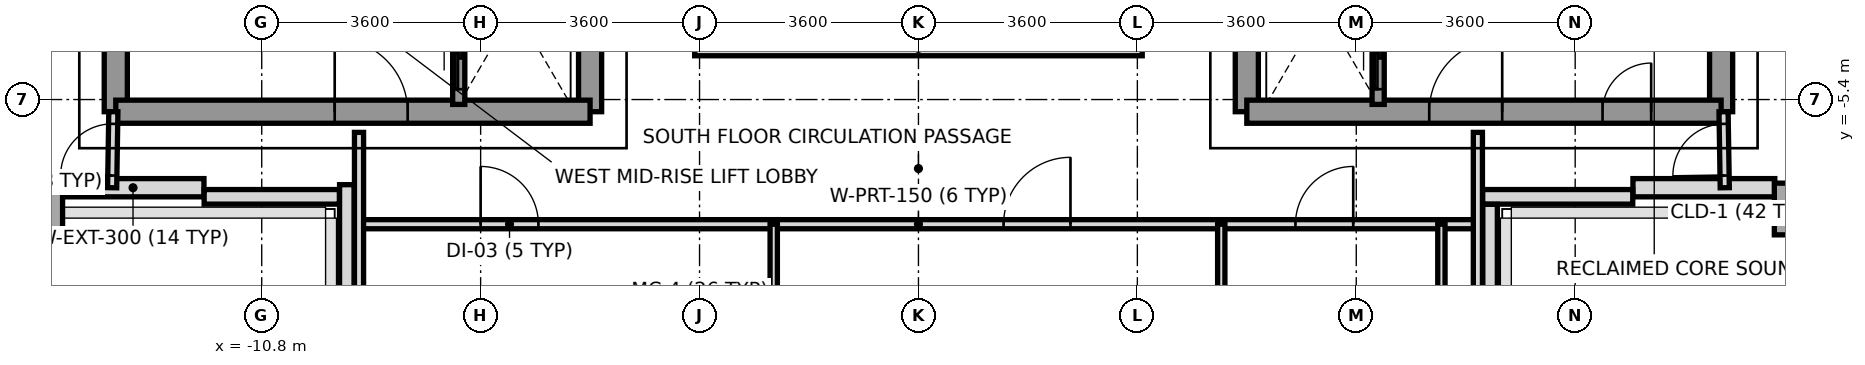
"""IFC4 building model, lengths in metres.
Left out: names, types, materials, properties, quantities, classifications, styles, units other than length and angle.
Written with IfcOpenShell. Run it as: python <this file> out.ifc"""

import sys

from ifc_helpers import new_model, si_unit, direction, frame, frame_2d, origin, origin_2d, place, context, subcontext, project, spatial, rectangle, extrude, source, transform, mapped, element, fill, save


model = new_model("IFC4")
c1 = context("Model", 3, precision=1e-05, world=origin(), true_north=direction((0.0, 1.0)))
c2 = subcontext(c1, "Body", "Model", "MODEL_VIEW")
j1 = project(units=[si_unit("LENGTHUNIT", "METRE"), si_unit("PLANEANGLEUNIT", "RADIAN")], contexts=[c1])
p1 = place(None, origin())
s1 = spatial("IfcSite", under=j1, at=p1, CompositionType="ELEMENT")
p2 = place(p1, origin())
s2 = spatial("IfcBuilding", under=s1, at=p2, CompositionType="ELEMENT")
p3 = place(p2, frame((0.0, 0.0, 170.6)))
s3 = spatial("IfcBuildingStorey", under=s2, at=p3, CompositionType="ELEMENT", Elevation=170.6)
m1 = source(origin(), c2, "Body", "SweptSolid", [
    extrude(rectangle(XDim=0.65, YDim=0.85, at=origin_2d()), origin(), (0.0, 0.0, 1.0), 3.2),
])
for number, where, z_axis, x_axis in (
    (1, (-14.4, -7.2, 0.0), (0.0, 0.0, 1.0), (1.0, 0.0, 0.0)),
    (2, (14.4, -7.2, 0.0), (0.0, 0.0, 1.0), (1.0, 0.0, 0.0)),
):
    element("IfcColumn", number, at=place(p3, frame(where, z_axis=z_axis, x_axis=x_axis)), inside=s3, PredefinedType="COLUMN", context=c2, shape_type="MappedRepresentation", body=[
        mapped(m1, transform((0.0, 0.0, 0.0), x_axis=(1.0, 0.0, 0.0), y_axis=(0.0, 1.0, 0.0), z_axis=(0.0, 0.0, 1.0), scale=1.0)),
    ])
for number, where, z_axis, x_axis in (
    (3, (-14.083, -6.85, 0.0), (0.0, 0.0, 1.0), (1.0, 0.0, 0.0)),
    (4, (11.75, -6.85, 0.0), (0.0, 0.0, 1.0), (1.0, 0.0, 0.0)),
):
    element("IfcWall", number, at=place(p3, frame(where, z_axis=z_axis, x_axis=x_axis)), inside=s3, PredefinedType="SOLIDWALL", context=c2, shape_type="SweptSolid", body=[
        extrude(rectangle(XDim=2.333, YDim=0.3, at=frame_2d((1.167, 0.0))), origin(), (0.0, 0.0, 1.0), 3.2),
    ])
p4 = place(p3, frame((11.747, -7.0, 0.0), z_axis=(0.0, 0.0, 1.0), x_axis=(-1.0, 0.0, 0.0)))
e5 = element("IfcWall", 5, at=p4, inside=s3, PredefinedType="PARAPET", context=c2, shape_type="SweptSolid", body=[
    extrude(rectangle(XDim=2.469, YDim=0.24, at=frame_2d((1.234, 0.0))), origin(), (0.0, 0.0, 1.0), 1.15),
])
p5 = place(p3, frame((9.4, -7.123, 0.0), z_axis=(0.0, 0.0, 1.0), x_axis=(0.0, -1.0, 0.0)))
e6 = element("IfcWall", 6, at=p5, inside=s3, PredefinedType="PARAPET", context=c2, shape_type="SweptSolid", body=[
    extrude(rectangle(XDim=1.424, YDim=0.24, at=frame_2d((0.712, 0.0))), origin(), (0.0, 0.0, 1.0), 1.15),
])
p6 = place(p3, frame((-9.4, -8.547, 0.0), z_axis=(0.0, 0.0, 1.0), x_axis=(0.0, 1.0, 0.0)))
e7 = element("IfcWall", 7, at=p6, inside=s3, PredefinedType="PARAPET", context=c2, shape_type="SweptSolid", body=[
    extrude(rectangle(XDim=1.747, YDim=0.24, at=frame_2d((0.874, 0.0))), origin(), (0.0, 0.0, 1.0), 1.15),
])
p7 = place(p3, frame((-9.523, -7.0, 0.0), z_axis=(0.0, 0.0, 1.0), x_axis=(-1.0, 0.0, 0.0)))
e8 = element("IfcWall", 8, at=p7, inside=s3, PredefinedType="PARAPET", context=c2, shape_type="SweptSolid", body=[
    extrude(rectangle(XDim=2.224, YDim=0.24, at=frame_2d((1.112, 0.0))), origin(), (0.0, 0.0, 1.0), 1.15),
])
p8 = place(p3, frame((-13.2, -5.6, 0.0), z_axis=(0.0, 0.0, 1.0), x_axis=(0.0, 1.0, 0.0)))
e9 = element("IfcWall", 9, at=p8, inside=s3, PredefinedType="SHEAR", context=c2, shape_type="SweptSolid", body=[
    extrude(rectangle(XDim=11.2, YDim=0.38, at=frame_2d((5.6, 0.0))), origin(), (0.0, 0.0, 1.0), 3.2),
])
p9 = place(p3, frame((-5.4, -5.6, 0.0), z_axis=(0.0, 0.0, 1.0), x_axis=(0.0, 1.0, 0.0)))
e10 = element("IfcWall", 10, at=p9, inside=s3, PredefinedType="SHEAR", context=c2, shape_type="SweptSolid", body=[
    extrude(rectangle(XDim=12.5, YDim=0.38, at=frame_2d((6.25, 0.0))), origin(), (0.0, 0.0, 1.0), 3.2),
])
p10 = place(p9, frame((4.55, 0.0, 0.0)))
e11 = element("IfcOpeningElement", 11, at=p10, cuts=e10, PredefinedType="OPENING", context=c2, shape_type="SweptSolid", body=[
    extrude(rectangle(XDim=1.2, YDim=2.2, at=frame_2d((0.6, 1.1))), frame((0.0, 0.2, 0.0), z_axis=(0.0, -1.0, 0.0), x_axis=(1.0, 0.0, 0.0)), (0.0, 0.0, 1.0), 0.4),
])
p11 = place(p3, frame((-13.2, -5.6, 0.0), z_axis=(0.0, 0.0, 1.0), x_axis=(1.0, 0.0, 0.0)))
e12 = element("IfcWall", 12, at=p11, inside=s3, PredefinedType="SHEAR", context=c2, shape_type="SweptSolid", body=[
    extrude(rectangle(XDim=7.8, YDim=0.38, at=frame_2d((3.9, 0.0))), origin(), (0.0, 0.0, 1.0), 3.2),
])
p12 = place(p11, frame((3.6, 0.0, 0.0)))
e13 = element("IfcOpeningElement", 13, at=p12, cuts=e12, PredefinedType="OPENING", context=c2, shape_type="SweptSolid", body=[
    extrude(rectangle(XDim=1.2, YDim=2.2, at=frame_2d((0.6, 1.1))), frame((0.0, 0.2, 0.0), z_axis=(0.0, -1.0, 0.0), x_axis=(1.0, 0.0, 0.0)), (0.0, 0.0, 1.0), 0.4),
])
p13 = place(p3, frame((13.2, -5.6, 0.0), z_axis=(0.0, 0.0, 1.0), x_axis=(0.0, 1.0, 0.0)))
e14 = element("IfcWall", 14, at=p13, inside=s3, PredefinedType="SHEAR", context=c2, shape_type="SweptSolid", body=[
    extrude(rectangle(XDim=11.2, YDim=0.38, at=frame_2d((5.6, 0.0))), origin(), (0.0, 0.0, 1.0), 3.2),
])
p14 = place(p3, frame((5.4, -5.6, 0.0), z_axis=(0.0, 0.0, 1.0), x_axis=(0.0, 1.0, 0.0)))
e15 = element("IfcWall", 15, at=p14, inside=s3, PredefinedType="SHEAR", context=c2, shape_type="SweptSolid", body=[
    extrude(rectangle(XDim=12.5, YDim=0.38, at=frame_2d((6.25, 0.0))), origin(), (0.0, 0.0, 1.0), 3.2),
])
p15 = place(p14, frame((4.55, 0.0, 0.0)))
e16 = element("IfcOpeningElement", 16, at=p15, cuts=e15, PredefinedType="OPENING", context=c2, shape_type="SweptSolid", body=[
    extrude(rectangle(XDim=1.2, YDim=2.2, at=frame_2d((0.6, 1.1))), frame((0.0, 0.2, 0.0), z_axis=(0.0, -1.0, 0.0), x_axis=(1.0, 0.0, 0.0)), (0.0, 0.0, 1.0), 0.4),
])
p16 = place(p14, frame((7.88, 0.0, 0.0)))
e17 = element("IfcOpeningElement", 17, at=p16, cuts=e15, PredefinedType="OPENING", context=c2, shape_type="SweptSolid", body=[
    extrude(rectangle(XDim=0.8, YDim=2.1, at=frame_2d((0.4, 1.05))), frame((0.0, 0.2, 0.0), z_axis=(0.0, -1.0, 0.0), x_axis=(1.0, 0.0, 0.0)), (0.0, 0.0, 1.0), 0.4),
])
p17 = place(p3, frame((5.4, -5.6, 0.0), z_axis=(0.0, 0.0, 1.0), x_axis=(1.0, 0.0, 0.0)))
e18 = element("IfcWall", 18, at=p17, inside=s3, PredefinedType="SHEAR", context=c2, shape_type="SweptSolid", body=[
    extrude(rectangle(XDim=7.8, YDim=0.38, at=frame_2d((3.9, 0.0))), origin(), (0.0, 0.0, 1.0), 3.2),
])
p18 = place(p17, frame((3.0, 0.0, 0.0)))
e19 = element("IfcOpeningElement", 19, at=p18, cuts=e18, PredefinedType="OPENING", context=c2, shape_type="SweptSolid", body=[
    extrude(rectangle(XDim=1.2, YDim=2.2, at=frame_2d((0.6, 1.1))), frame((0.0, 0.2, 0.0), z_axis=(0.0, -1.0, 0.0), x_axis=(1.0, 0.0, 0.0)), (0.0, 0.0, 1.0), 0.4),
])
p19 = place(p17, frame((5.85, 0.0, 0.0)))
e20 = element("IfcOpeningElement", 20, at=p19, cuts=e18, PredefinedType="OPENING", context=c2, shape_type="SweptSolid", body=[
    extrude(rectangle(XDim=0.8, YDim=2.1, at=frame_2d((0.4, 1.05))), frame((0.0, 0.2, 0.0), z_axis=(0.0, -1.0, 0.0), x_axis=(1.0, 0.0, 0.0)), (0.0, 0.0, 1.0), 0.4),
])
p20 = place(p3, frame((-7.56, -5.48, 0.0), z_axis=(0.0, 0.0, 1.0), x_axis=(0.0, 1.0, 0.0)))
e21 = element("IfcWall", 21, at=p20, inside=s3, PredefinedType="SOLIDWALL", context=c2, shape_type="SweptSolid", body=[
    extrude(rectangle(XDim=1.6, YDim=0.2, at=frame_2d((0.8, 0.0))), origin(), (0.0, 0.0, 1.0), 3.2),
])
p21 = place(p20, frame((0.25, 0.0, 0.0)))
e22 = element("IfcOpeningElement", 22, at=p21, cuts=e21, PredefinedType="OPENING", context=c2, shape_type="SweptSolid", body=[
    extrude(rectangle(XDim=1.1, YDim=2.2, at=frame_2d((0.55, 1.1))), frame((0.0, 0.11, 0.0), z_axis=(0.0, -1.0, 0.0), x_axis=(1.0, 0.0, 0.0)), (0.0, 0.0, 1.0), 0.22),
])
p22 = place(p3, frame((7.56, -5.48, 0.0), z_axis=(0.0, 0.0, 1.0), x_axis=(0.0, 1.0, 0.0)))
e23 = element("IfcWall", 23, at=p22, inside=s3, PredefinedType="SOLIDWALL", context=c2, shape_type="SweptSolid", body=[
    extrude(rectangle(XDim=1.6, YDim=0.2, at=frame_2d((0.8, 0.0))), origin(), (0.0, 0.0, 1.0), 3.2),
])
p23 = place(p22, frame((0.25, 0.0, 0.0)))
e24 = element("IfcOpeningElement", 24, at=p23, cuts=e23, PredefinedType="OPENING", context=c2, shape_type="SweptSolid", body=[
    extrude(rectangle(XDim=1.1, YDim=2.2, at=frame_2d((0.55, 1.1))), frame((0.0, 0.11, 0.0), z_axis=(0.0, -1.0, 0.0), x_axis=(1.0, 0.0, 0.0)), (0.0, 0.0, 1.0), 0.22),
])
p24 = place(p3, frame((-9.2, -7.45, 0.0), z_axis=(0.0, 0.0, 1.0), x_axis=(1.0, 0.0, 0.0)))
e25 = element("IfcWall", 25, at=p24, inside=s3, PredefinedType="PARTITIONING", context=c2, shape_type="SweptSolid", body=[
    extrude(rectangle(XDim=18.4, YDim=0.15, at=frame_2d((9.2, 0.0))), origin(), (0.0, 0.0, 1.0), 2.8),
])
p25 = place(p24, frame((15.4, 0.0, 0.0)))
e26 = element("IfcOpeningElement", 26, at=p25, cuts=e25, PredefinedType="OPENING", context=c2, shape_type="SweptSolid", body=[
    extrude(rectangle(XDim=0.95, YDim=2.15, at=frame_2d((0.475, 1.075))), frame((0.0, 0.085, 0.0), z_axis=(0.0, -1.0, 0.0), x_axis=(1.0, 0.0, 0.0)), (0.0, 0.0, 1.0), 0.17),
])
p26 = place(p24, frame((2.0, 0.0, 0.0)))
e27 = element("IfcOpeningElement", 27, at=p26, cuts=e25, PredefinedType="OPENING", context=c2, shape_type="SweptSolid", body=[
    extrude(rectangle(XDim=0.95, YDim=2.15, at=frame_2d((0.475, 1.075))), frame((0.0, 0.085, 0.0), z_axis=(0.0, -1.0, 0.0), x_axis=(1.0, 0.0, 0.0)), (0.0, 0.0, 1.0), 0.17),
])
p27 = place(p24, frame((10.6, 0.0, 0.0)))
e28 = element("IfcOpeningElement", 28, at=p27, cuts=e25, PredefinedType="OPENING", context=c2, shape_type="SweptSolid", body=[
    extrude(rectangle(XDim=1.1, YDim=2.2, at=frame_2d((0.55, 1.1))), frame((0.0, 0.085, 0.0), z_axis=(0.0, -1.0, 0.0), x_axis=(1.0, 0.0, 0.0)), (0.0, 0.0, 1.0), 0.17),
])
for number, where, z_axis, x_axis in (
    (29, (-9.2, -15.68, 0.0), (0.0, 0.0, 1.0), (0.0, 1.0, 0.0)),
    (30, (9.2, -15.68, 0.0), (0.0, 0.0, 1.0), (0.0, 1.0, 0.0)),
):
    element("IfcWall", number, at=place(p3, frame(where, z_axis=z_axis, x_axis=x_axis)), inside=s3, PredefinedType="PARTITIONING", context=c2, shape_type="SweptSolid", body=[
        extrude(rectangle(XDim=9.74, YDim=0.15, at=frame_2d((4.87, 0.0))), origin(), (0.0, 0.0, 1.0), 2.75),
    ])
p28 = place(p3, frame((4.98, -10.95, 0.0), z_axis=(0.0, 0.0, 1.0), x_axis=(0.0, 1.0, 0.0)))
e31 = element("IfcWall", 31, at=p28, inside=s3, PredefinedType="PARTITIONING", context=c2, shape_type="SweptSolid", body=[
    extrude(rectangle(XDim=3.5, YDim=0.12, at=frame_2d((1.75, 0.0))), origin(), (0.0, 0.0, 1.0), 3.2),
])
p29 = place(p3, frame((8.6, -10.95, 0.0), z_axis=(0.0, 0.0, 1.0), x_axis=(0.0, 1.0, 0.0)))
e32 = element("IfcWall", 32, at=p29, inside=s3, PredefinedType="PARTITIONING", context=c2, shape_type="SweptSolid", body=[
    extrude(rectangle(XDim=3.5, YDim=0.12, at=frame_2d((1.75, 0.0))), origin(), (0.0, 0.0, 1.0), 2.75),
])
p30 = place(p3, frame((-2.38, -24.65, 0.0), z_axis=(0.0, 0.0, 1.0), x_axis=(0.0, 1.0, 0.0)))
e33 = element("IfcWall", 33, at=p30, inside=s3, PredefinedType="PARTITIONING", context=c2, shape_type="SweptSolid", body=[
    extrude(rectangle(XDim=17.2, YDim=0.12, at=frame_2d((8.6, 0.0))), origin(), (0.0, 0.0, 1.0), 2.75),
])
p31 = place(p3, frame((-13.26, -6.85, 0.0), z_axis=(0.0, 0.0, 1.0), x_axis=(0.016013571389, 0.999871774545, 0.0)))
e34 = element("IfcWall", 34, at=p31, inside=s3, PredefinedType="PARTITIONING", context=c2, shape_type="SweptSolid", body=[
    extrude(rectangle(XDim=1.25, YDim=0.15, at=frame_2d((0.625, 0.0))), origin(), (0.0, 0.0, 1.0), 3.2),
])
p32 = place(p31, frame((0.2, 0.0, 0.0)))
e35 = element("IfcOpeningElement", 35, at=p32, cuts=e34, PredefinedType="OPENING", context=c2, shape_type="SweptSolid", body=[
    extrude(rectangle(XDim=0.85, YDim=2.1, at=frame_2d((0.425, 1.05))), frame((0.0, 0.085, 0.0), z_axis=(0.0, -1.0, 0.0), x_axis=(1.0, 0.0, 0.0)), (0.0, 0.0, 1.0), 0.17),
])
p33 = place(p3, frame((13.26, -6.85, 0.0), z_axis=(0.0, 0.0, 1.0), x_axis=(-0.016013571389, 0.999871774545, 0.0)))
e36 = element("IfcWall", 36, at=p33, inside=s3, PredefinedType="PARTITIONING", context=c2, shape_type="SweptSolid", body=[
    extrude(rectangle(XDim=1.25, YDim=0.15, at=frame_2d((0.625, 0.0))), origin(), (0.0, 0.0, 1.0), 3.2),
])
p34 = place(p33, frame((0.2, 0.0, 0.0)))
e37 = element("IfcOpeningElement", 37, at=p34, cuts=e36, PredefinedType="OPENING", context=c2, shape_type="SweptSolid", body=[
    extrude(rectangle(XDim=0.85, YDim=2.1, at=frame_2d((0.425, 1.05))), frame((0.0, 0.085, 0.0), z_axis=(0.0, -1.0, 0.0), x_axis=(1.0, 0.0, 0.0)), (0.0, 0.0, 1.0), 0.17),
])
p35 = place(p3, frame((-3.68, -4.56, 0.0), z_axis=(0.0, 0.0, 1.0), x_axis=(1.0, 0.0, 0.0)))
e38 = element("IfcWall", 38, at=p35, inside=s3, PredefinedType="PARAPET", context=c2, shape_type="SweptSolid", body=[
    extrude(rectangle(XDim=7.36, YDim=0.24, at=frame_2d((3.68, 0.0))), origin(), (0.0, 0.0, 1.0), 1.15),
])
m2 = source(origin(), c2, "Body", "SweptSolid", [
    extrude(rectangle(XDim=1.2, YDim=2.2, at=frame_2d((0.6, 1.1))), frame((0.0, 0.025, 0.0), z_axis=(0.0, -1.0, 0.0), x_axis=(1.0, 0.0, 0.0)), (0.0, 0.0, 1.0), 0.05),
])
p36 = place(p12, origin())
e39 = element("IfcDoor", 39, at=p36, inside=s3, OperationType="SINGLE_SWING_LEFT", PredefinedType="DOOR", context=c2, shape_type="MappedRepresentation", body=[
    mapped(m2, transform((0.0, 0.0, 0.0), x_axis=(1.0, 0.0, 0.0), y_axis=(0.0, 1.0, 0.0), z_axis=(0.0, 0.0, 1.0), scale=1.0)),
])
fill(e13, e39)
p37 = place(p18, origin())
e40 = element("IfcDoor", 40, at=p37, inside=s3, OperationType="SINGLE_SWING_RIGHT", PredefinedType="DOOR", context=c2, shape_type="MappedRepresentation", body=[
    mapped(m2, transform((0.0, 0.0, 0.0), x_axis=(1.0, 0.0, 0.0), y_axis=(0.0, 1.0, 0.0), z_axis=(0.0, 0.0, 1.0), scale=1.0)),
])
fill(e19, e40)
m3 = source(origin(), c2, "Body", "SweptSolid", [
    extrude(rectangle(XDim=0.8, YDim=2.1, at=frame_2d((0.4, 1.05))), frame((0.0, 0.025, 0.0), z_axis=(0.0, -1.0, 0.0), x_axis=(1.0, 0.0, 0.0)), (0.0, 0.0, 1.0), 0.05),
])
p38 = place(p19, origin())
e41 = element("IfcDoor", 41, at=p38, inside=s3, OperationType="SINGLE_SWING_RIGHT", PredefinedType="DOOR", context=c2, shape_type="MappedRepresentation", body=[
    mapped(m3, transform((0.0, 0.0, 0.0), x_axis=(1.0, 0.0, 0.0), y_axis=(0.0, 1.0, 0.0), z_axis=(0.0, 0.0, 1.0), scale=1.0)),
])
fill(e20, e41)
m4 = source(origin(), c2, "Body", "SweptSolid", [
    extrude(rectangle(XDim=1.1, YDim=2.2, at=frame_2d((0.55, 1.1))), frame((0.0, 0.025, 0.0), z_axis=(0.0, -1.0, 0.0), x_axis=(1.0, 0.0, 0.0)), (0.0, 0.0, 1.0), 0.05),
])
p39 = place(p21, origin())
e42 = element("IfcDoor", 42, at=p39, inside=s3, OperationType="SLIDING_TO_LEFT", PredefinedType="DOOR", context=c2, shape_type="MappedRepresentation", body=[
    mapped(m4, transform((0.0, 0.0, 0.0), x_axis=(1.0, 0.0, 0.0), y_axis=(0.0, 1.0, 0.0), z_axis=(0.0, 0.0, 1.0), scale=1.0)),
])
fill(e22, e42)
p40 = place(p23, origin())
e43 = element("IfcDoor", 43, at=p40, inside=s3, OperationType="SLIDING_TO_LEFT", PredefinedType="DOOR", context=c2, shape_type="MappedRepresentation", body=[
    mapped(m4, transform((0.0, 0.0, 0.0), x_axis=(1.0, 0.0, 0.0), y_axis=(0.0, 1.0, 0.0), z_axis=(0.0, 0.0, 1.0), scale=1.0)),
])
fill(e24, e43)
m5 = source(origin(), c2, "Body", "SweptSolid", [
    extrude(rectangle(XDim=0.95, YDim=2.15, at=frame_2d((0.475, 1.075))), frame((0.0, 0.025, 0.0), z_axis=(0.0, -1.0, 0.0), x_axis=(1.0, 0.0, 0.0)), (0.0, 0.0, 1.0), 0.05),
])
p41 = place(p25, origin())
e44 = element("IfcDoor", 44, at=p41, inside=s3, OperationType="SINGLE_SWING_RIGHT", PredefinedType="DOOR", context=c2, shape_type="MappedRepresentation", body=[
    mapped(m5, transform((0.0, 0.0, 0.0), x_axis=(1.0, 0.0, 0.0), y_axis=(0.0, 1.0, 0.0), z_axis=(0.0, 0.0, 1.0), scale=1.0)),
])
fill(e26, e44)
p42 = place(p26, origin())
e45 = element("IfcDoor", 45, at=p42, inside=s3, OperationType="SINGLE_SWING_LEFT", PredefinedType="DOOR", context=c2, shape_type="MappedRepresentation", body=[
    mapped(m5, transform((0.0, 0.0, 0.0), x_axis=(1.0, 0.0, 0.0), y_axis=(0.0, 1.0, 0.0), z_axis=(0.0, 0.0, 1.0), scale=1.0)),
])
fill(e27, e45)
p43 = place(p27, origin())
e46 = element("IfcDoor", 46, at=p43, inside=s3, OperationType="SINGLE_SWING_RIGHT", PredefinedType="DOOR", context=c2, shape_type="MappedRepresentation", body=[
    mapped(m4, transform((0.0, 0.0, 0.0), x_axis=(1.0, 0.0, 0.0), y_axis=(0.0, 1.0, 0.0), z_axis=(0.0, 0.0, 1.0), scale=1.0)),
])
fill(e28, e46)
m6 = source(origin(), c2, "Body", "SweptSolid", [
    extrude(rectangle(XDim=0.85, YDim=2.1, at=frame_2d((0.425, 1.05))), frame((0.0, 0.025, 0.0), z_axis=(0.0, -1.0, 0.0), x_axis=(1.0, 0.0, 0.0)), (0.0, 0.0, 1.0), 0.05),
])
p44 = place(p32, origin())
e47 = element("IfcDoor", 47, at=p44, inside=s3, OperationType="SINGLE_SWING_LEFT", PredefinedType="DOOR", context=c2, shape_type="MappedRepresentation", body=[
    mapped(m6, transform((0.0, 0.0, 0.0), x_axis=(1.0, 0.0, 0.0), y_axis=(0.0, 1.0, 0.0), z_axis=(0.0, 0.0, 1.0), scale=1.0)),
])
fill(e35, e47)
p45 = place(p34, origin())
e48 = element("IfcDoor", 48, at=p45, inside=s3, OperationType="SINGLE_SWING_LEFT", PredefinedType="DOOR", context=c2, shape_type="MappedRepresentation", body=[
    mapped(m6, transform((0.0, 0.0, 0.0), x_axis=(1.0, 0.0, 0.0), y_axis=(0.0, 1.0, 0.0), z_axis=(0.0, 0.0, 1.0), scale=1.0)),
])
fill(e37, e48)
save(model, sys.argv[1])
